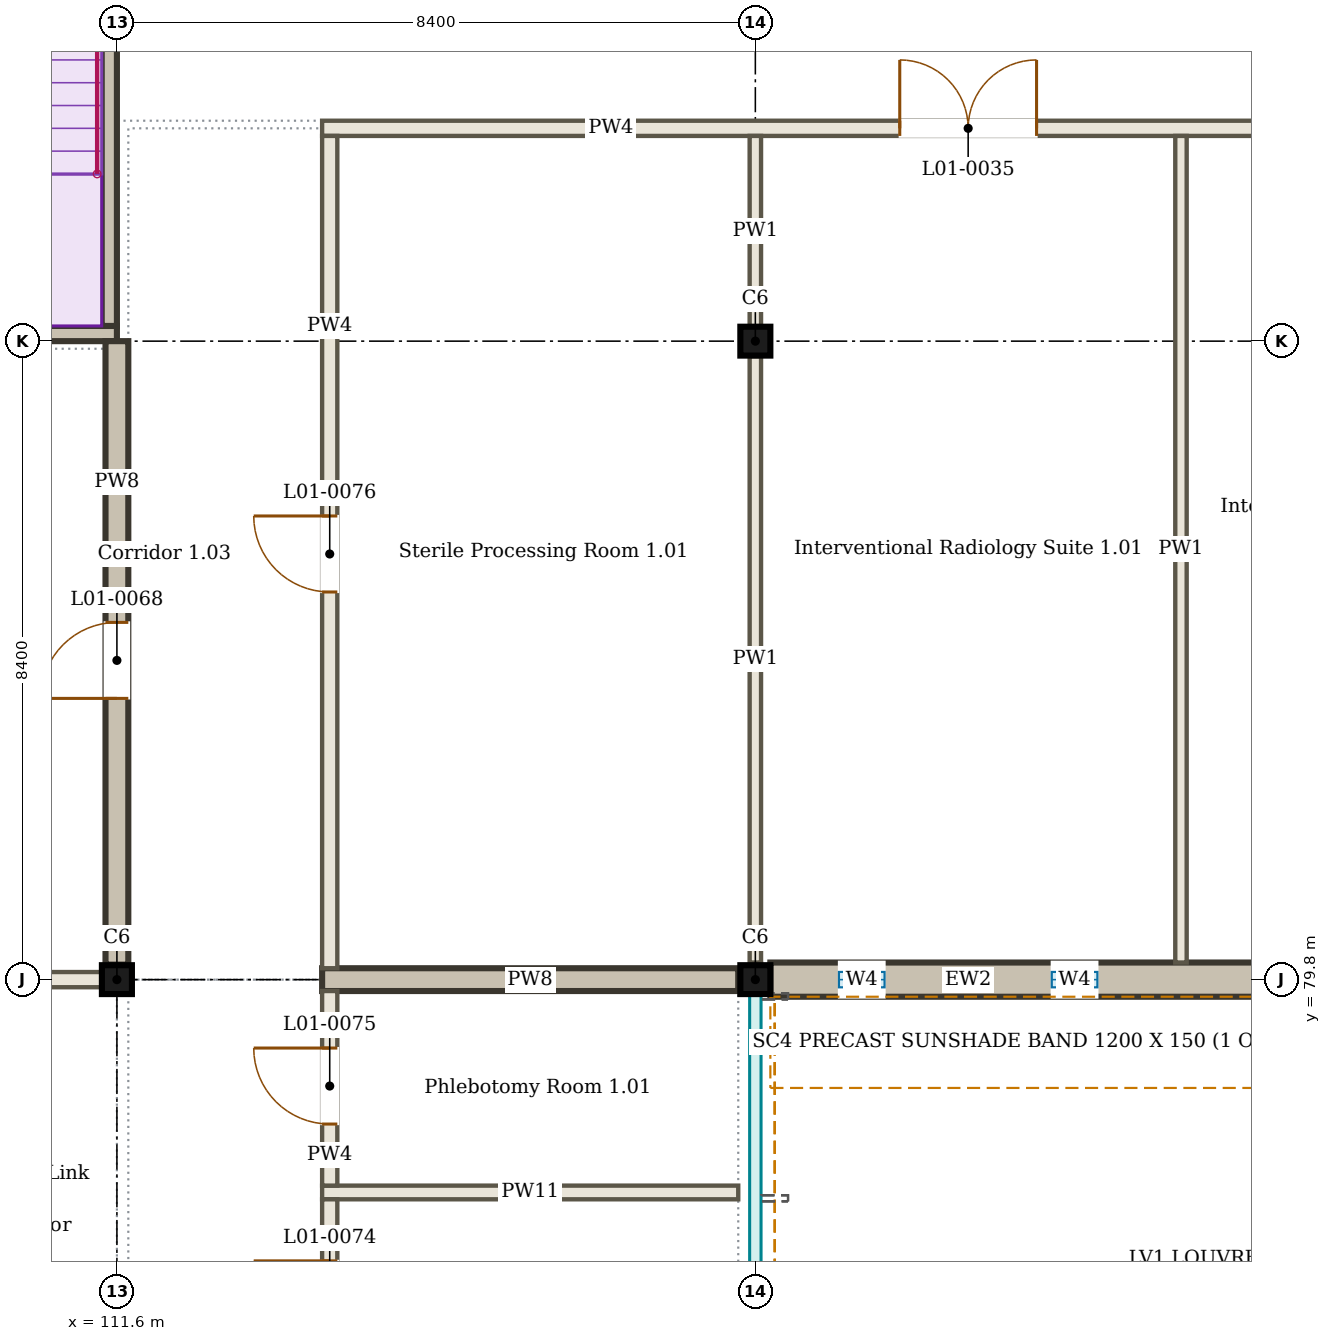
"""IFC4 building model, lengths in metres.
Left out: names, types, materials, properties, quantities, classifications, styles, units other than length and angle.
Written with IfcOpenShell. Run it as: python <this file> out.ifc"""

import sys

from ifc_helpers import new_model, si_unit, direction, frame, frame_2d, origin, origin_2d, place, context, subcontext, project, spatial, rectangle, i_section, extrude, element, fill, save


model = new_model("IFC4")
c1 = context("Model", 3, precision=1e-05, world=origin(), true_north=direction((0.0, 1.0)))
c2 = subcontext(c1, "Body", "Model", "MODEL_VIEW")
j1 = project(units=[si_unit("LENGTHUNIT", "METRE"), si_unit("PLANEANGLEUNIT", "RADIAN")], contexts=[c1])
p1 = place(None, origin())
s1 = spatial("IfcSite", under=j1, at=p1, CompositionType="ELEMENT")
p2 = place(p1, origin())
s2 = spatial("IfcBuilding", under=s1, at=p2, CompositionType="ELEMENT")
p3 = place(p2, frame((0.0, 0.0, 4.5)))
s3 = spatial("IfcBuildingStorey", under=s2, at=p3, CompositionType="ELEMENT", Elevation=4.5)
for number, where, z_axis, x_axis in (
    (1, (111.6, 79.8, 0.0), (0.0, 0.0, 1.0), (1.0, 0.0, 0.0)),
    (2, (120.0, 79.8, 0.0), (0.0, 0.0, 1.0), (1.0, 0.0, 0.0)),
    (3, (120.0, 88.2, 0.0), (0.0, 0.0, 1.0), (1.0, 0.0, 0.0)),
):
    element("IfcColumn", number, at=place(p3, frame(where, z_axis=z_axis, x_axis=x_axis)), inside=s3, PredefinedType="COLUMN", context=c2, shape_type="SweptSolid", body=[
        extrude(i_section(OverallWidth=0.395, OverallDepth=0.38, WebThickness=0.019, FlangeThickness=0.03, FilletRadius=0.027, at=origin_2d()), origin(), (0.0, 0.0, 1.0), 4.5),
    ])
p4 = place(p3, frame((120.198, 79.8, 0.0), z_axis=(0.0, 0.0, 1.0), x_axis=(1.0, 0.0, 0.0)))
e4 = element("IfcWall", 4, at=p4, inside=s3, PredefinedType="SOLIDWALL", context=c2, shape_type="SweptSolid", body=[
    extrude(rectangle(XDim=8.005, YDim=0.45, at=frame_2d((4.002, 0.0))), origin(), (0.0, 0.0, 1.0), 3.936),
])
p5 = place(p4, frame((0.903, 0.0, 2.1)))
e5 = element("IfcOpeningElement", 5, at=p5, cuts=e4, PredefinedType="OPENING", context=c2, shape_type="SweptSolid", body=[
    extrude(rectangle(XDim=0.6, YDim=1.2, at=frame_2d((0.3, 0.6))), frame((0.0, 0.235, 0.0), z_axis=(0.0, -1.0, 0.0), x_axis=(1.0, 0.0, 0.0)), (0.0, 0.0, 1.0), 0.47),
])
p6 = place(p4, frame((3.702, 0.0, 2.1)))
e6 = element("IfcOpeningElement", 6, at=p6, cuts=e4, PredefinedType="OPENING", context=c2, shape_type="SweptSolid", body=[
    extrude(rectangle(XDim=0.6, YDim=1.2, at=frame_2d((0.3, 0.6))), frame((0.0, 0.235, 0.0), z_axis=(0.0, -1.0, 0.0), x_axis=(1.0, 0.0, 0.0)), (0.0, 0.0, 1.0), 0.47),
])
p7 = place(p4, frame((6.502, 0.0, 2.1)))
e7 = element("IfcOpeningElement", 7, at=p7, cuts=e4, PredefinedType="OPENING", context=c2, shape_type="SweptSolid", body=[
    extrude(rectangle(XDim=0.6, YDim=1.2, at=frame_2d((0.3, 0.6))), frame((0.0, 0.235, 0.0), z_axis=(0.0, -1.0, 0.0), x_axis=(1.0, 0.0, 0.0)), (0.0, 0.0, 1.0), 0.47),
])
p8 = place(p3, frame((120.198, 79.64, 3.956), z_axis=(0.0, 0.0, 1.0), x_axis=(1.0, 0.0, 0.0)))
e8 = element("IfcWall", 8, at=p8, inside=s3, PredefinedType="SOLIDWALL", context=c2, shape_type="SweptSolid", body=[
    extrude(rectangle(XDim=8.005, YDim=0.13, at=frame_2d((4.002, 0.0))), origin(), (0.0, 0.0, 1.0), 0.544),
])
p9 = place(p3, frame((114.3, 77.0, 0.0), z_axis=(0.0, 0.0, 1.0), x_axis=(1.0, 0.0, 0.0)))
e9 = element("IfcWall", 9, at=p9, inside=s3, PredefinedType="PARTITIONING", context=c2, shape_type="SweptSolid", body=[
    extrude(rectangle(XDim=5.475, YDim=0.18, at=frame_2d((2.737, 0.0))), origin(), (0.0, 0.0, 1.0), 3.996),
])
p10 = place(p3, frame((103.4, 79.8, 0.0), z_axis=(0.0, 0.0, 1.0), x_axis=(1.0, 0.0, 0.0)))
e10 = element("IfcWall", 10, at=p10, inside=s3, PredefinedType="PARTITIONING", context=c2, shape_type="SweptSolid", body=[
    extrude(rectangle(XDim=8.003, YDim=0.2, at=frame_2d((4.001, 0.0))), origin(), (0.0, 0.0, 1.0), 3.781),
])
p11 = place(p10, frame((1.3, 0.0, 0.0)))
e11 = element("IfcOpeningElement", 11, at=p11, cuts=e10, PredefinedType="OPENING", context=c2, shape_type="SweptSolid", body=[
    extrude(rectangle(XDim=1.0, YDim=2.1, at=frame_2d((0.5, 1.05))), frame((0.0, 0.11, 0.0), z_axis=(0.0, -1.0, 0.0), x_axis=(1.0, 0.0, 0.0)), (0.0, 0.0, 1.0), 0.22),
])
p12 = place(p3, frame((114.3, 79.8, 0.0), z_axis=(0.0, 0.0, 1.0), x_axis=(1.0, 0.0, 0.0)))
e12 = element("IfcWall", 12, at=p12, inside=s3, PredefinedType="SOLIDWALL", context=c2, shape_type="SweptSolid", body=[
    extrude(rectangle(XDim=5.475, YDim=0.3, at=frame_2d((2.737, 0.0))), origin(), (0.0, 0.0, 1.0), 3.936),
])
p13 = place(p3, frame((114.3, 91.0, 0.0), z_axis=(0.0, 0.0, 1.0), x_axis=(1.0, 0.0, 0.0)))
e13 = element("IfcWall", 13, at=p13, inside=s3, PredefinedType="PARTITIONING", context=c2, shape_type="SweptSolid", body=[
    extrude(rectangle(XDim=19.8, YDim=0.2, at=frame_2d((9.9, 0.0))), origin(), (0.0, 0.0, 1.0), 3.8),
])
p14 = place(p13, frame((7.6, 0.0, 0.0)))
e14 = element("IfcOpeningElement", 14, at=p14, cuts=e13, PredefinedType="OPENING", context=c2, shape_type="SweptSolid", body=[
    extrude(rectangle(XDim=1.8, YDim=2.1, at=frame_2d((0.9, 1.05))), frame((0.0, 0.11, 0.0), z_axis=(0.0, -1.0, 0.0), x_axis=(1.0, 0.0, 0.0)), (0.0, 0.0, 1.0), 0.22),
])
p15 = place(p13, frame((13.2, 0.0, 0.0)))
e15 = element("IfcOpeningElement", 15, at=p15, cuts=e13, PredefinedType="OPENING", context=c2, shape_type="SweptSolid", body=[
    extrude(rectangle(XDim=1.8, YDim=2.1, at=frame_2d((0.9, 1.05))), frame((0.0, 0.11, 0.0), z_axis=(0.0, -1.0, 0.0), x_axis=(1.0, 0.0, 0.0)), (0.0, 0.0, 1.0), 0.22),
])
p16 = place(p3, frame((111.6, 79.998, 0.0), z_axis=(0.0, 0.0, 1.0), x_axis=(0.0, 1.0, 0.0)))
e16 = element("IfcWall", 16, at=p16, inside=s3, PredefinedType="SOLIDWALL", context=c2, shape_type="SweptSolid", body=[
    extrude(rectangle(XDim=8.202, YDim=0.3, at=frame_2d((4.101, 0.0))), origin(), (0.0, 0.0, 1.0), 3.8),
])
p17 = place(p16, frame((3.502, 0.0, 0.0)))
e17 = element("IfcOpeningElement", 17, at=p17, cuts=e16, PredefinedType="OPENING", context=c2, shape_type="SweptSolid", body=[
    extrude(rectangle(XDim=1.0, YDim=2.1, at=frame_2d((0.5, 1.05))), frame((0.0, 0.16, 0.0), z_axis=(0.0, -1.0, 0.0), x_axis=(1.0, 0.0, 0.0)), (0.0, 0.0, 1.0), 0.32),
])
p18 = place(p3, frame((114.4, 74.29, 0.0), z_axis=(0.0, 0.0, 1.0), x_axis=(0.0, 1.0, 0.0)))
e18 = element("IfcWall", 18, at=p18, inside=s3, PredefinedType="PARTITIONING", context=c2, shape_type="SweptSolid", body=[
    extrude(rectangle(XDim=2.62, YDim=0.2, at=frame_2d((1.31, 0.0))), origin(), (0.0, 0.0, 1.0), 3.996),
])
p19 = place(p18, frame((0.81, 0.0, 0.0)))
e19 = element("IfcOpeningElement", 19, at=p19, cuts=e18, PredefinedType="OPENING", context=c2, shape_type="SweptSolid", body=[
    extrude(rectangle(XDim=1.0, YDim=2.1, at=frame_2d((0.5, 1.05))), frame((0.0, 0.11, 0.0), z_axis=(0.0, -1.0, 0.0), x_axis=(1.0, 0.0, 0.0)), (0.0, 0.0, 1.0), 0.22),
])
p20 = place(p3, frame((114.4, 77.09, 0.0), z_axis=(0.0, 0.0, 1.0), x_axis=(0.0, 1.0, 0.0)))
e20 = element("IfcWall", 20, at=p20, inside=s3, PredefinedType="PARTITIONING", context=c2, shape_type="SweptSolid", body=[
    extrude(rectangle(XDim=2.56, YDim=0.2, at=frame_2d((1.28, 0.0))), origin(), (0.0, 0.0, 1.0), 3.996),
])
p21 = place(p20, frame((0.81, 0.0, 0.0)))
e21 = element("IfcOpeningElement", 21, at=p21, cuts=e20, PredefinedType="OPENING", context=c2, shape_type="SweptSolid", body=[
    extrude(rectangle(XDim=1.0, YDim=2.1, at=frame_2d((0.5, 1.05))), frame((0.0, 0.11, 0.0), z_axis=(0.0, -1.0, 0.0), x_axis=(1.0, 0.0, 0.0)), (0.0, 0.0, 1.0), 0.22),
])
p22 = place(p3, frame((114.4, 79.95, 0.0), z_axis=(0.0, 0.0, 1.0), x_axis=(0.0, 1.0, 0.0)))
e22 = element("IfcWall", 22, at=p22, inside=s3, PredefinedType="PARTITIONING", context=c2, shape_type="SweptSolid", body=[
    extrude(rectangle(XDim=10.95, YDim=0.2, at=frame_2d((5.475, 0.0))), origin(), (0.0, 0.0, 1.0), 3.8),
])
p23 = place(p22, frame((4.95, 0.0, 0.0)))
e23 = element("IfcOpeningElement", 23, at=p23, cuts=e22, PredefinedType="OPENING", context=c2, shape_type="SweptSolid", body=[
    extrude(rectangle(XDim=1.0, YDim=2.1, at=frame_2d((0.5, 1.05))), frame((0.0, 0.11, 0.0), z_axis=(0.0, -1.0, 0.0), x_axis=(1.0, 0.0, 0.0)), (0.0, 0.0, 1.0), 0.22),
])
p24 = place(p3, frame((120.0, 80.025, 0.0), z_axis=(0.0, 0.0, 1.0), x_axis=(0.0, 1.0, 0.0)))
e24 = element("IfcWall", 24, at=p24, inside=s3, PredefinedType="PARTITIONING", context=c2, shape_type="SweptSolid", body=[
    extrude(rectangle(XDim=7.978, YDim=0.15, at=frame_2d((3.989, 0.0))), origin(), (0.0, 0.0, 1.0), 3.8),
])
p25 = place(p3, frame((120.0, 88.397, 0.0), z_axis=(0.0, 0.0, 1.0), x_axis=(0.0, 1.0, 0.0)))
e25 = element("IfcWall", 25, at=p25, inside=s3, PredefinedType="PARTITIONING", context=c2, shape_type="SweptSolid", body=[
    extrude(rectangle(XDim=2.502, YDim=0.15, at=frame_2d((1.251, 0.0))), origin(), (0.0, 0.0, 1.0), 3.8),
])
p26 = place(p3, frame((125.6, 80.025, 0.0), z_axis=(0.0, 0.0, 1.0), x_axis=(0.0, 1.0, 0.0)))
e26 = element("IfcWall", 26, at=p26, inside=s3, PredefinedType="PARTITIONING", context=c2, shape_type="SweptSolid", body=[
    extrude(rectangle(XDim=10.875, YDim=0.15, at=frame_2d((5.438, 0.0))), origin(), (0.0, 0.0, 1.0), 3.8),
])
p27 = place(p3, frame((111.6, 88.3, 0.0), z_axis=(0.0, 0.0, 1.0), x_axis=(-1.0, 0.0, 0.0)))
e27 = element("IfcWall", 27, at=p27, inside=s3, PredefinedType="SOLIDWALL", context=c2, shape_type="SweptSolid", body=[
    extrude(rectangle(XDim=8.4, YDim=0.2, at=frame_2d((4.2, 0.0))), origin(), (0.0, 0.0, 1.0), 4.5),
])
p28 = place(p27, frame((4.725, 0.0, 0.0)))
e28 = element("IfcOpeningElement", 28, at=p28, cuts=e27, PredefinedType="OPENING", context=c2, shape_type="SweptSolid", body=[
    extrude(rectangle(XDim=1.3, YDim=2.1, at=frame_2d((0.65, 1.05))), frame((0.0, 0.11, 0.0), z_axis=(0.0, -1.0, 0.0), x_axis=(1.0, 0.0, 0.0)), (0.0, 0.0, 1.0), 0.22),
])
p29 = place(p3, frame((111.5, 88.4, 0.0), z_axis=(0.0, 0.0, 1.0), x_axis=(0.0, 1.0, 0.0)))
e29 = element("IfcWall", 29, at=p29, inside=s3, PredefinedType="SOLIDWALL", context=c2, shape_type="SweptSolid", body=[
    extrude(rectangle(XDim=7.975, YDim=0.2, at=frame_2d((3.988, 0.0))), origin(), (0.0, 0.0, 1.0), 4.5),
])
p30 = place(p5, origin())
e30 = element("IfcWindow", 30, at=p30, inside=s3, PartitioningType="SINGLE_PANEL", PredefinedType="WINDOW", context=c2, shape_type="SweptSolid", body=[
    extrude(rectangle(XDim=0.6, YDim=1.2, at=frame_2d((0.3, 0.6))), frame((0.0, 0.135, 0.0), z_axis=(0.0, -1.0, 0.0), x_axis=(1.0, 0.0, 0.0)), (0.0, 0.0, 1.0), 0.06),
])
fill(e5, e30)
p31 = place(p6, origin())
e31 = element("IfcWindow", 31, at=p31, inside=s3, PartitioningType="SINGLE_PANEL", PredefinedType="WINDOW", context=c2, shape_type="SweptSolid", body=[
    extrude(rectangle(XDim=0.6, YDim=1.2, at=frame_2d((0.3, 0.6))), frame((0.0, 0.135, 0.0), z_axis=(0.0, -1.0, 0.0), x_axis=(1.0, 0.0, 0.0)), (0.0, 0.0, 1.0), 0.06),
])
fill(e6, e31)
p32 = place(p14, origin())
e32 = element("IfcDoor", 32, at=p32, inside=s3, OperationType="DOUBLE_DOOR_SINGLE_SWING", PredefinedType="DOOR", context=c2, shape_type="SweptSolid", body=[
    extrude(rectangle(XDim=1.8, YDim=2.1, at=frame_2d((0.9, 1.05))), frame((0.0, 0.025, 0.0), z_axis=(0.0, -1.0, 0.0), x_axis=(1.0, 0.0, 0.0)), (0.0, 0.0, 1.0), 0.05),
])
fill(e14, e32)
p33 = place(p17, origin())
e33 = element("IfcDoor", 33, at=p33, inside=s3, OperationType="SINGLE_SWING_LEFT", PredefinedType="DOOR", context=c2, shape_type="SweptSolid", body=[
    extrude(rectangle(XDim=1.0, YDim=2.1, at=frame_2d((0.5, 1.05))), frame((0.0, 0.025, 0.0), z_axis=(0.0, -1.0, 0.0), x_axis=(1.0, 0.0, 0.0)), (0.0, 0.0, 1.0), 0.05),
])
fill(e17, e33)
p34 = place(p19, origin())
e34 = element("IfcDoor", 34, at=p34, inside=s3, OperationType="SINGLE_SWING_RIGHT", PredefinedType="DOOR", context=c2, shape_type="SweptSolid", body=[
    extrude(rectangle(XDim=1.0, YDim=2.1, at=frame_2d((0.5, 1.05))), frame((0.0, 0.025, 0.0), z_axis=(0.0, -1.0, 0.0), x_axis=(1.0, 0.0, 0.0)), (0.0, 0.0, 1.0), 0.05),
])
fill(e19, e34)
p35 = place(p21, origin())
e35 = element("IfcDoor", 35, at=p35, inside=s3, OperationType="SINGLE_SWING_RIGHT", PredefinedType="DOOR", context=c2, shape_type="SweptSolid", body=[
    extrude(rectangle(XDim=1.0, YDim=2.1, at=frame_2d((0.5, 1.05))), frame((0.0, 0.025, 0.0), z_axis=(0.0, -1.0, 0.0), x_axis=(1.0, 0.0, 0.0)), (0.0, 0.0, 1.0), 0.05),
])
fill(e21, e35)
p36 = place(p23, origin())
e36 = element("IfcDoor", 36, at=p36, inside=s3, OperationType="SINGLE_SWING_RIGHT", PredefinedType="DOOR", context=c2, shape_type="SweptSolid", body=[
    extrude(rectangle(XDim=1.0, YDim=2.1, at=frame_2d((0.5, 1.05))), frame((0.0, 0.025, 0.0), z_axis=(0.0, -1.0, 0.0), x_axis=(1.0, 0.0, 0.0)), (0.0, 0.0, 1.0), 0.05),
])
fill(e23, e36)
save(model, sys.argv[1])
